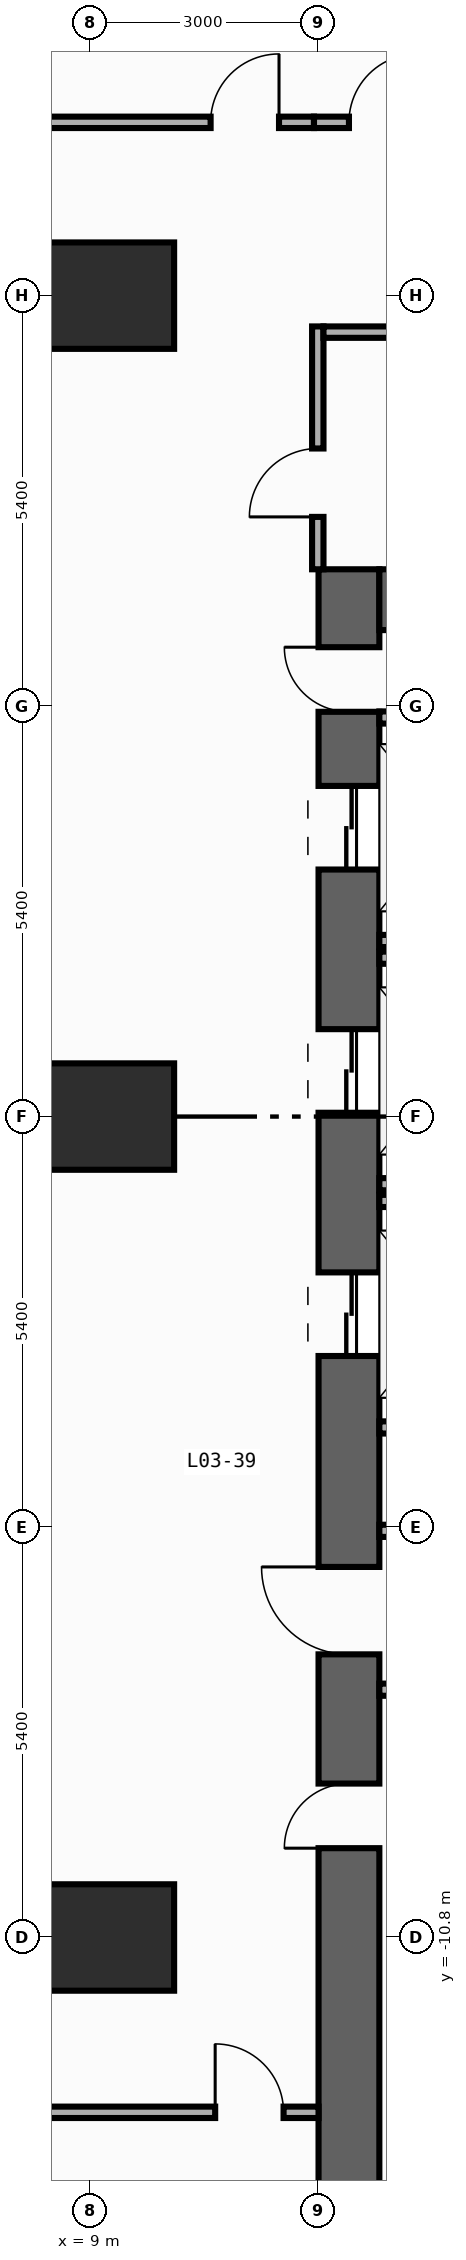
"""IFC4 building model, lengths in metres.
Left out: names, types, materials, properties, quantities, classifications, styles, units other than length and angle.
Written with IfcOpenShell. Run it as: python <this file> out.ifc"""

import sys

from ifc_helpers import new_model, si_unit, direction, frame, frame_2d, origin, origin_2d, place, context, subcontext, project, spatial, rectangle, extrude, element, fill, save


model = new_model("IFC4")
c1 = context("Model", 3, precision=1e-05, world=origin(), true_north=direction((0.0, 1.0)))
c2 = subcontext(c1, "Body", "Model", "MODEL_VIEW")
j1 = project(units=[si_unit("LENGTHUNIT", "METRE"), si_unit("PLANEANGLEUNIT", "RADIAN")], contexts=[c1])
p1 = place(None, origin())
s1 = spatial("IfcSite", under=j1, at=p1, CompositionType="ELEMENT")
p2 = place(p1, origin())
s2 = spatial("IfcBuilding", under=s1, at=p2, CompositionType="ELEMENT")
p3 = place(p2, frame((0.0, 0.0, 11.0)))
s3 = spatial("IfcBuildingStorey", under=s2, at=p3, CompositionType="ELEMENT", Elevation=11.0)
p4 = place(p3, frame((12.4, -19.8, 0.0), z_axis=(0.0, 0.0, 1.0), x_axis=(0.0, 1.0, 0.0)))
e1 = element("IfcWall", 1, at=p4, inside=s3, PredefinedType="SHEAR", context=c2, shape_type="SweptSolid", body=[
    extrude(rectangle(XDim=27.0, YDim=0.8, at=frame_2d((13.5, 0.0))), origin(), (0.0, 0.0, 1.0), 4.7),
])
p5 = place(p4, frame((23.05, 0.0, 0.0)))
e2 = element("IfcOpeningElement", 2, at=p5, cuts=e1, PredefinedType="OPENING", context=c2, shape_type="SweptSolid", body=[
    extrude(rectangle(XDim=1.1, YDim=2.2, at=frame_2d((0.55, 1.1))), frame((0.0, 0.41, 0.0), z_axis=(0.0, -1.0, 0.0), x_axis=(1.0, 0.0, 0.0)), (0.0, 0.0, 1.0), 0.82),
])
p6 = place(p4, frame((19.85, 0.0, 0.0)))
e3 = element("IfcOpeningElement", 3, at=p6, cuts=e1, PredefinedType="OPENING", context=c2, shape_type="SweptSolid", body=[
    extrude(rectangle(XDim=1.1, YDim=2.2, at=frame_2d((0.55, 1.1))), frame((0.0, 0.41, 0.0), z_axis=(0.0, -1.0, 0.0), x_axis=(1.0, 0.0, 0.0)), (0.0, 0.0, 1.0), 0.82),
])
p7 = place(p4, frame((16.65, 0.0, 0.0)))
e4 = element("IfcOpeningElement", 4, at=p7, cuts=e1, PredefinedType="OPENING", context=c2, shape_type="SweptSolid", body=[
    extrude(rectangle(XDim=1.1, YDim=2.2, at=frame_2d((0.55, 1.1))), frame((0.0, 0.41, 0.0), z_axis=(0.0, -1.0, 0.0), x_axis=(1.0, 0.0, 0.0)), (0.0, 0.0, 1.0), 0.82),
])
p8 = place(p4, frame((10.175, 0.0, 0.0)))
e5 = element("IfcOpeningElement", 5, at=p8, cuts=e1, PredefinedType="OPENING", context=c2, shape_type="SweptSolid", body=[
    extrude(rectangle(XDim=0.85, YDim=2.1, at=frame_2d((0.425, 1.05))), frame((0.0, 0.41, 0.0), z_axis=(0.0, -1.0, 0.0), x_axis=(1.0, 0.0, 0.0)), (0.0, 0.0, 1.0), 0.82),
])
p9 = place(p4, frame((12.725, 0.0, 0.0)))
e6 = element("IfcOpeningElement", 6, at=p9, cuts=e1, PredefinedType="OPENING", context=c2, shape_type="SweptSolid", body=[
    extrude(rectangle(XDim=1.15, YDim=2.2, at=frame_2d((0.575, 1.1))), frame((0.0, 0.41, 0.0), z_axis=(0.0, -1.0, 0.0), x_axis=(1.0, 0.0, 0.0)), (0.0, 0.0, 1.0), 0.82),
])
p10 = place(p4, frame((25.125, 0.0, 0.0)))
e7 = element("IfcOpeningElement", 7, at=p10, cuts=e1, PredefinedType="OPENING", context=c2, shape_type="SweptSolid", body=[
    extrude(rectangle(XDim=0.85, YDim=2.1, at=frame_2d((0.425, 1.05))), frame((0.0, 0.41, 0.0), z_axis=(0.0, -1.0, 0.0), x_axis=(1.0, 0.0, 0.0)), (0.0, 0.0, 1.0), 0.82),
])
p11 = place(p3, frame((12.8, 6.8, 0.0), z_axis=(0.0, 0.0, 1.0), x_axis=(1.0, 0.0, 0.0)))
e8 = element("IfcWall", 8, at=p11, inside=s3, PredefinedType="SHEAR", context=c2, shape_type="SweptSolid", body=[
    extrude(rectangle(XDim=6.8, YDim=0.8, at=frame_2d((3.4, 0.0))), origin(), (0.0, 0.0, 1.0), 4.7),
])
for number, where, z_axis, x_axis in (
    (9, (9.2, -10.8, 0.0), (0.0, 0.0, 1.0), (1.0, 0.0, 0.0)),
    (10, (9.2, 0.0, 0.0), (0.0, 0.0, 1.0), (1.0, 0.0, 0.0)),
    (11, (9.2, 10.8, 0.0), (0.0, 0.0, 1.0), (1.0, 0.0, 0.0)),
):
    element("IfcColumn", number, at=place(p3, frame(where, z_axis=z_axis, x_axis=x_axis)), inside=s3, PredefinedType="COLUMN", context=c2, shape_type="SweptSolid", body=[
        extrude(rectangle(XDim=1.8, YDim=1.4, at=origin_2d()), origin(), (0.0, 0.0, 1.0), 5.0),
    ])
for number, where, z_axis, x_axis in (
    (12, (12.8, 2.31, 0.0), (0.0, 0.0, 1.0), (1.0, 0.0, 0.0)),
    (13, (12.8, -0.89, 0.0), (0.0, 0.0, 1.0), (1.0, 0.0, 0.0)),
    (14, (12.8, 2.09, 0.0), (0.0, 0.0, 1.0), (1.0, 0.0, 0.0)),
    (15, (12.8, -4.09, 0.0), (0.0, 0.0, 1.0), (1.0, 0.0, 0.0)),
    (16, (12.8, -1.11, 0.0), (0.0, 0.0, 1.0), (1.0, 0.0, 0.0)),
):
    element("IfcWall", number, at=place(p3, frame(where, z_axis=z_axis, x_axis=x_axis)), inside=s3, PredefinedType="STANDARD", context=c2, shape_type="SweptSolid", body=[
        extrude(rectangle(XDim=2.19, YDim=0.16, at=frame_2d((1.095, 0.0))), origin(), (0.0, 0.0, 1.0), 4.7),
    ])
for number, where, z_axis, x_axis in (
    (17, (12.8, -5.45, 0.0), (0.0, 0.0, 1.0), (1.0, 0.0, 0.0)),
    (18, (12.8, -7.54, 0.0), (0.0, 0.0, 1.0), (1.0, 0.0, 0.0)),
    (19, (12.8, 5.25, 0.0), (0.0, 0.0, 1.0), (1.0, 0.0, 0.0)),
):
    element("IfcWall", number, at=place(p3, frame(where, z_axis=z_axis, x_axis=x_axis)), inside=s3, PredefinedType="STANDARD", context=c2, shape_type="SweptSolid", body=[
        extrude(rectangle(XDim=2.6, YDim=0.16, at=frame_2d((1.3, 0.0))), origin(), (0.0, 0.0, 1.0), 4.7),
    ])
p12 = place(p3, frame((11.99, 7.2, 0.0), z_axis=(0.0, 0.0, 1.0), x_axis=(0.0, 1.0, 0.0)))
e20 = element("IfcWall", 20, at=p12, inside=s3, PredefinedType="PARTITIONING", context=c2, shape_type="SweptSolid", body=[
    extrude(rectangle(XDim=3.195, YDim=0.15, at=frame_2d((1.598, 0.0))), origin(), (0.0, 0.0, 1.0), 4.7),
])
p13 = place(p12, frame((0.689, 0.0, 0.0)))
e21 = element("IfcOpeningElement", 21, at=p13, cuts=e20, PredefinedType="OPENING", context=c2, shape_type="SweptSolid", body=[
    extrude(rectangle(XDim=0.9, YDim=2.15, at=frame_2d((0.45, 1.075))), frame((0.0, 0.085, 0.0), z_axis=(0.0, -1.0, 0.0), x_axis=(1.0, 0.0, 0.0)), (0.0, 0.0, 1.0), 0.17),
])
p14 = place(p3, frame((8.205, 13.08, 0.0), z_axis=(0.0, 0.0, 1.0), x_axis=(1.0, 0.0, 0.0)))
e22 = element("IfcWall", 22, at=p14, inside=s3, PredefinedType="PARTITIONING", context=c2, shape_type="SweptSolid", body=[
    extrude(rectangle(XDim=3.735, YDim=0.15, at=frame_2d((1.867, 0.0))), origin(), (0.0, 0.0, 1.0), 4.7),
])
p15 = place(p14, frame((2.375, 0.0, 0.0)))
e23 = element("IfcOpeningElement", 23, at=p15, cuts=e22, PredefinedType="OPENING", context=c2, shape_type="SweptSolid", body=[
    extrude(rectangle(XDim=0.9, YDim=2.15, at=frame_2d((0.45, 1.075))), frame((0.0, 0.085, 0.0), z_axis=(0.0, -1.0, 0.0), x_axis=(1.0, 0.0, 0.0)), (0.0, 0.0, 1.0), 0.17),
])
p16 = place(p3, frame((8.205, -13.1, 0.0), z_axis=(0.0, 0.0, 1.0), x_axis=(1.0, 0.0, 0.0)))
e24 = element("IfcWall", 24, at=p16, inside=s3, PredefinedType="PARTITIONING", context=c2, shape_type="SweptSolid", body=[
    extrude(rectangle(XDim=3.795, YDim=0.15, at=frame_2d((1.897, 0.0))), origin(), (0.0, 0.0, 1.0), 4.7),
])
p17 = place(p16, frame((2.435, 0.0, 0.0)))
e25 = element("IfcOpeningElement", 25, at=p17, cuts=e24, PredefinedType="OPENING", context=c2, shape_type="SweptSolid", body=[
    extrude(rectangle(XDim=0.9, YDim=2.15, at=frame_2d((0.45, 1.075))), frame((0.0, 0.085, 0.0), z_axis=(0.0, -1.0, 0.0), x_axis=(1.0, 0.0, 0.0)), (0.0, 0.0, 1.0), 0.17),
])
p18 = place(p3, frame((12.065, 10.32, 0.0), z_axis=(0.0, 0.0, 1.0), x_axis=(1.0, 0.0, 0.0)))
e26 = element("IfcWall", 26, at=p18, inside=s3, PredefinedType="PARTITIONING", context=c2, shape_type="SweptSolid", body=[
    extrude(rectangle(XDim=8.41, YDim=0.15, at=frame_2d((4.205, 0.0))), origin(), (0.0, 0.0, 1.0), 4.7),
])
p19 = place(p18, frame((4.785, 0.0, 0.0)))
e27 = element("IfcOpeningElement", 27, at=p19, cuts=e26, PredefinedType="OPENING", context=c2, shape_type="SweptSolid", body=[
    extrude(rectangle(XDim=0.9, YDim=2.15, at=frame_2d((0.45, 1.075))), frame((0.0, 0.085, 0.0), z_axis=(0.0, -1.0, 0.0), x_axis=(1.0, 0.0, 0.0)), (0.0, 0.0, 1.0), 0.17),
])
p20 = place(p3, frame((11.94, 13.08, 0.0), z_axis=(0.0, 0.0, 1.0), x_axis=(1.0, 0.0, 0.0)))
e28 = element("IfcWall", 28, at=p20, inside=s3, PredefinedType="PARTITIONING", context=c2, shape_type="SweptSolid", body=[
    extrude(rectangle(XDim=2.34, YDim=0.15, at=frame_2d((1.17, 0.0))), origin(), (0.0, 0.0, 1.0), 4.7),
])
p21 = place(p20, frame((0.46, 0.0, 0.0)))
e29 = element("IfcOpeningElement", 29, at=p21, cuts=e28, PredefinedType="OPENING", context=c2, shape_type="SweptSolid", body=[
    extrude(rectangle(XDim=0.9, YDim=2.15, at=frame_2d((0.45, 1.075))), frame((0.0, 0.085, 0.0), z_axis=(0.0, -1.0, 0.0), x_axis=(1.0, 0.0, 0.0)), (0.0, 0.0, 1.0), 0.17),
])
p22 = place(p5, origin())
e30 = element("IfcDoor", 30, at=p22, inside=s3, OperationType="DOUBLE_DOOR_SLIDING", PredefinedType="DOOR", context=c2, shape_type="SweptSolid", body=[
    extrude(rectangle(XDim=1.1, YDim=2.2, at=frame_2d((0.55, 1.1))), frame((0.0, 0.025, 0.0), z_axis=(0.0, -1.0, 0.0), x_axis=(1.0, 0.0, 0.0)), (0.0, 0.0, 1.0), 0.05),
])
fill(e2, e30)
p23 = place(p6, origin())
e31 = element("IfcDoor", 31, at=p23, inside=s3, OperationType="DOUBLE_DOOR_SLIDING", PredefinedType="DOOR", context=c2, shape_type="SweptSolid", body=[
    extrude(rectangle(XDim=1.1, YDim=2.2, at=frame_2d((0.55, 1.1))), frame((0.0, 0.025, 0.0), z_axis=(0.0, -1.0, 0.0), x_axis=(1.0, 0.0, 0.0)), (0.0, 0.0, 1.0), 0.05),
])
fill(e3, e31)
p24 = place(p7, origin())
e32 = element("IfcDoor", 32, at=p24, inside=s3, OperationType="DOUBLE_DOOR_SLIDING", PredefinedType="DOOR", context=c2, shape_type="SweptSolid", body=[
    extrude(rectangle(XDim=1.1, YDim=2.2, at=frame_2d((0.55, 1.1))), frame((0.0, 0.025, 0.0), z_axis=(0.0, -1.0, 0.0), x_axis=(1.0, 0.0, 0.0)), (0.0, 0.0, 1.0), 0.05),
])
fill(e4, e32)
p25 = place(p8, origin())
e33 = element("IfcDoor", 33, at=p25, inside=s3, OperationType="SINGLE_SWING_LEFT", PredefinedType="DOOR", context=c2, shape_type="SweptSolid", body=[
    extrude(rectangle(XDim=0.85, YDim=2.1, at=frame_2d((0.425, 1.05))), frame((0.0, 0.025, 0.0), z_axis=(0.0, -1.0, 0.0), x_axis=(1.0, 0.0, 0.0)), (0.0, 0.0, 1.0), 0.05),
])
fill(e5, e33)
p26 = place(p9, origin())
e34 = element("IfcDoor", 34, at=p26, inside=s3, OperationType="SINGLE_SWING_RIGHT", PredefinedType="DOOR", context=c2, shape_type="SweptSolid", body=[
    extrude(rectangle(XDim=1.15, YDim=2.2, at=frame_2d((0.575, 1.1))), frame((0.0, 0.025, 0.0), z_axis=(0.0, -1.0, 0.0), x_axis=(1.0, 0.0, 0.0)), (0.0, 0.0, 1.0), 0.05),
])
fill(e6, e34)
p27 = place(p10, origin())
e35 = element("IfcDoor", 35, at=p27, inside=s3, OperationType="SINGLE_SWING_RIGHT", PredefinedType="DOOR", context=c2, shape_type="SweptSolid", body=[
    extrude(rectangle(XDim=0.85, YDim=2.1, at=frame_2d((0.425, 1.05))), frame((0.0, 0.025, 0.0), z_axis=(0.0, -1.0, 0.0), x_axis=(1.0, 0.0, 0.0)), (0.0, 0.0, 1.0), 0.05),
])
fill(e7, e35)
p28 = place(p13, origin())
e36 = element("IfcDoor", 36, at=p28, inside=s3, OperationType="SINGLE_SWING_LEFT", PredefinedType="DOOR", context=c2, shape_type="SweptSolid", body=[
    extrude(rectangle(XDim=0.9, YDim=2.15, at=frame_2d((0.45, 1.075))), frame((0.0, 0.025, 0.0), z_axis=(0.0, -1.0, 0.0), x_axis=(1.0, 0.0, 0.0)), (0.0, 0.0, 1.0), 0.05),
])
fill(e21, e36)
p29 = place(p15, origin())
e37 = element("IfcDoor", 37, at=p29, inside=s3, OperationType="SINGLE_SWING_RIGHT", PredefinedType="DOOR", context=c2, shape_type="SweptSolid", body=[
    extrude(rectangle(XDim=0.9, YDim=2.15, at=frame_2d((0.45, 1.075))), frame((0.0, 0.025, 0.0), z_axis=(0.0, -1.0, 0.0), x_axis=(1.0, 0.0, 0.0)), (0.0, 0.0, 1.0), 0.05),
])
fill(e23, e37)
p30 = place(p17, origin())
e38 = element("IfcDoor", 38, at=p30, inside=s3, OperationType="SINGLE_SWING_LEFT", PredefinedType="DOOR", context=c2, shape_type="SweptSolid", body=[
    extrude(rectangle(XDim=0.9, YDim=2.15, at=frame_2d((0.45, 1.075))), frame((0.0, 0.025, 0.0), z_axis=(0.0, -1.0, 0.0), x_axis=(1.0, 0.0, 0.0)), (0.0, 0.0, 1.0), 0.05),
])
fill(e25, e38)
p31 = place(p21, origin())
e39 = element("IfcDoor", 39, at=p31, inside=s3, OperationType="SINGLE_SWING_RIGHT", PredefinedType="DOOR", context=c2, shape_type="SweptSolid", body=[
    extrude(rectangle(XDim=0.9, YDim=2.15, at=frame_2d((0.45, 1.075))), frame((0.0, 0.025, 0.0), z_axis=(0.0, -1.0, 0.0), x_axis=(1.0, 0.0, 0.0)), (0.0, 0.0, 1.0), 0.05),
])
fill(e29, e39)
save(model, sys.argv[1])
